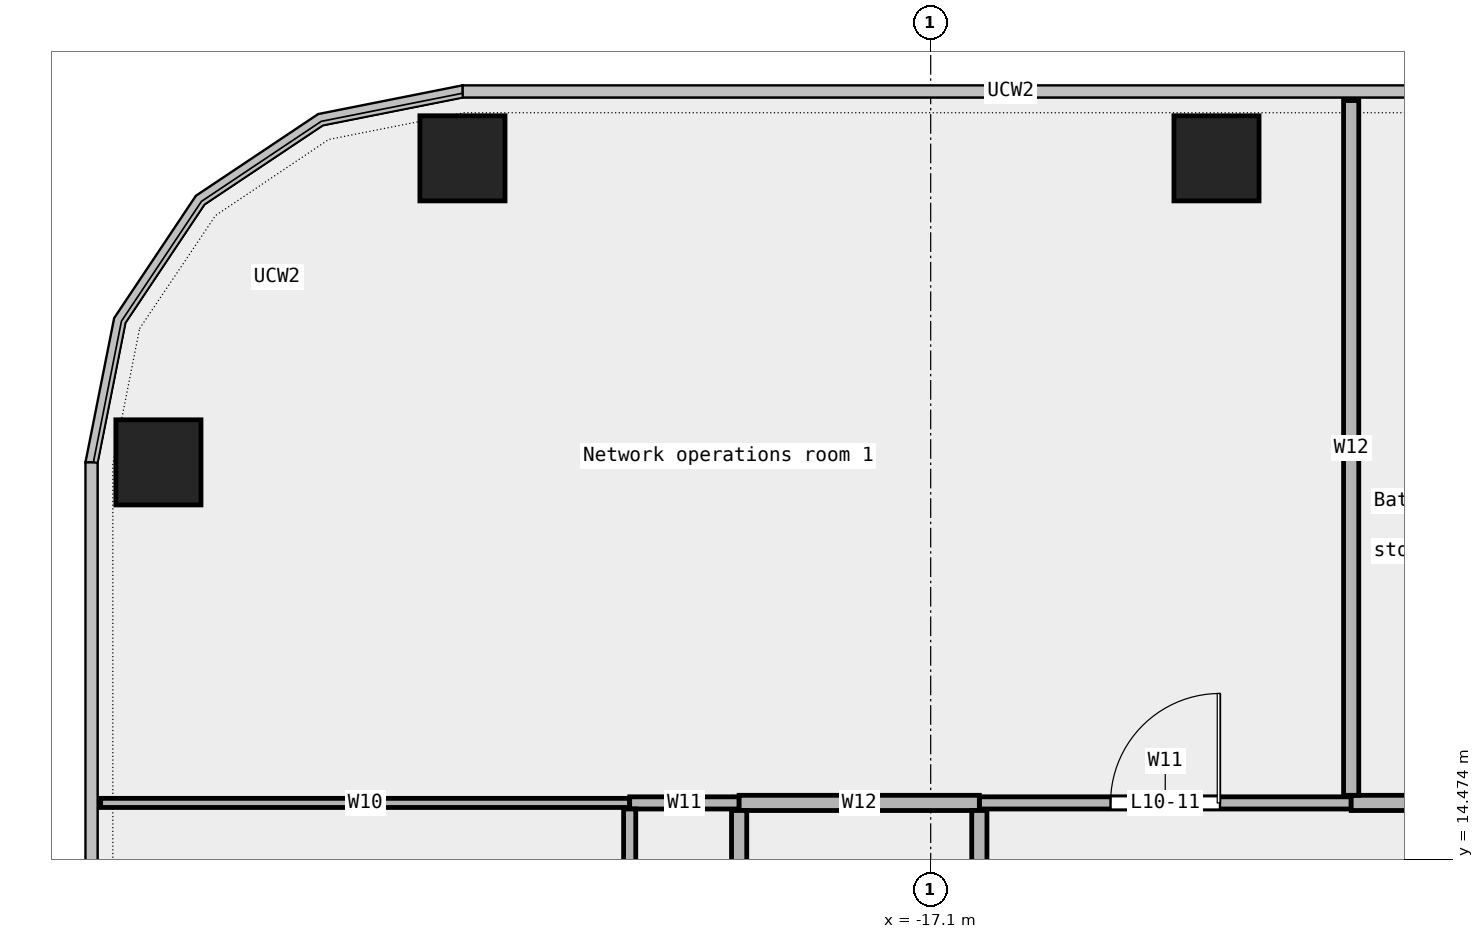
"""IFC4 building model, lengths in metres.
Left out: names, types, materials, properties, quantities, classifications, styles, units other than length and angle.
Written with IfcOpenShell. Run it as: python <this file> out.ifc"""

import sys

from ifc_helpers import new_model, si_unit, direction, frame, frame_2d, origin, origin_2d, place, context, subcontext, project, spatial, rectangle, extrude, element, fill, save


model = new_model("IFC4")
c1 = context("Model", 3, precision=1e-05, world=origin(), true_north=direction((0.0, 1.0)))
c2 = subcontext(c1, "Body", "Model", "MODEL_VIEW")
j1 = project(units=[si_unit("LENGTHUNIT", "METRE"), si_unit("PLANEANGLEUNIT", "RADIAN")], contexts=[c1])
p1 = place(None, origin())
s1 = spatial("IfcSite", under=j1, at=p1, CompositionType="ELEMENT")
p2 = place(p1, origin())
s2 = spatial("IfcBuilding", under=s1, at=p2, CompositionType="ELEMENT")
p3 = place(p2, frame((0.0, 0.0, 55.0)))
s3 = spatial("IfcBuildingStorey", under=s2, at=p3, CompositionType="ELEMENT", Elevation=55.0)
for number, where, z_axis, x_axis in (
    (1, (-12.4, 26.0, 0.0), (0.0, 0.0, 1.0), (1.0, 0.0, 0.0)),
    (2, (-24.8, 26.0, 0.0), (0.0, 0.0, 1.0), (1.0, 0.0, 0.0)),
    (3, (-29.8, 21.0, 0.0), (0.0, 0.0, 1.0), (1.0, 0.0, 0.0)),
):
    element("IfcColumn", number, at=place(p3, frame(where, z_axis=z_axis, x_axis=x_axis)), inside=s3, PredefinedType="COLUMN", context=c2, shape_type="SweptSolid", body=[
        extrude(rectangle(XDim=1.4, YDim=1.4, at=origin_2d()), origin(), (0.0, 0.0, 1.0), 4.35),
    ])
p4 = place(p3, frame((-30.75, 15.4, 0.0), z_axis=(0.0, 0.0, 1.0), x_axis=(1.0, 0.0, 0.0)))
e4 = element("IfcWall", 4, at=p4, inside=s3, PredefinedType="PARTITIONING", context=c2, shape_type="SweptSolid", body=[
    extrude(rectangle(XDim=8.7, YDim=0.15, at=frame_2d((4.35, 0.0))), origin(), (0.0, 0.0, 1.0), 4.35),
])
p5 = place(p3, frame((-22.05, 15.4, 0.0), z_axis=(0.0, 0.0, 1.0), x_axis=(1.0, 0.0, 0.0)))
e5 = element("IfcWall", 5, at=p5, inside=s3, PredefinedType="PARTITIONING", context=c2, shape_type="SweptSolid", body=[
    extrude(rectangle(XDim=1.8, YDim=0.2, at=frame_2d((0.9, 0.0))), origin(), (0.0, 0.0, 1.0), 4.35),
])
p6 = place(p3, frame((-16.3, 15.4, 0.0), z_axis=(0.0, 0.0, 1.0), x_axis=(1.0, 0.0, 0.0)))
e6 = element("IfcWall", 6, at=p6, inside=s3, PredefinedType="PARTITIONING", context=c2, shape_type="SweptSolid", body=[
    extrude(rectangle(XDim=6.115, YDim=0.2, at=frame_2d((3.058, 0.0))), origin(), (0.0, 0.0, 1.0), 4.35),
])
p7 = place(p6, frame((2.157, 0.0, 0.0)))
e7 = element("IfcOpeningElement", 7, at=p7, cuts=e6, PredefinedType="OPENING", context=c2, shape_type="SweptSolid", body=[
    extrude(rectangle(XDim=1.8, YDim=2.1, at=frame_2d((0.9, 1.05))), frame((0.0, 0.112, 0.0), z_axis=(0.0, -1.0, 0.0), x_axis=(1.0, 0.0, 0.0)), (0.0, 0.0, 1.0), 0.224),
])
p8 = place(p3, frame((-20.25, 15.4, 0.0), z_axis=(0.0, 0.0, 1.0), x_axis=(1.0, 0.0, 0.0)))
e8 = element("IfcWall", 8, at=p8, inside=s3, PredefinedType="PARTITIONING", context=c2, shape_type="SweptSolid", body=[
    extrude(rectangle(XDim=3.95, YDim=0.25, at=frame_2d((1.975, 0.0))), origin(), (0.0, 0.0, 1.0), 4.35),
])
p9 = place(p3, frame((-10.185, 15.4, 0.0), z_axis=(0.0, 0.0, 1.0), x_axis=(1.0, 0.0, 0.0)))
e9 = element("IfcWall", 9, at=p9, inside=s3, PredefinedType="PARTITIONING", context=c2, shape_type="SweptSolid", body=[
    extrude(rectangle(XDim=3.42, YDim=0.25, at=frame_2d((1.71, 0.0))), origin(), (0.0, 0.0, 1.0), 4.35),
])
p10 = place(p9, frame((1.26, 0.0, 0.0)))
e10 = element("IfcOpeningElement", 10, at=p10, cuts=e9, PredefinedType="OPENING", context=c2, shape_type="SweptSolid", body=[
    extrude(rectangle(XDim=0.9, YDim=2.1, at=frame_2d((0.45, 1.05))), frame((0.0, 0.137, 0.0), z_axis=(0.0, -1.0, 0.0), x_axis=(1.0, 0.0, 0.0)), (0.0, 0.0, 1.0), 0.274),
])
p11 = place(p3, frame((-22.05, -9.0, 0.0), z_axis=(0.0, 0.0, 1.0), x_axis=(0.0, 1.0, 0.0)))
e11 = element("IfcWall", 11, at=p11, inside=s3, PredefinedType="PARTITIONING", context=c2, shape_type="SweptSolid", body=[
    extrude(rectangle(XDim=24.3, YDim=0.2, at=frame_2d((12.15, 0.0))), origin(), (0.0, 0.0, 1.0), 4.35),
])
p12 = place(p11, frame((17.067, 0.0, 0.0)))
e12 = element("IfcOpeningElement", 12, at=p12, cuts=e11, PredefinedType="OPENING", context=c2, shape_type="SweptSolid", body=[
    extrude(rectangle(XDim=1.5, YDim=2.1, at=frame_2d((0.75, 1.05))), frame((0.0, 0.112, 0.0), z_axis=(0.0, -1.0, 0.0), x_axis=(1.0, 0.0, 0.0)), (0.0, 0.0, 1.0), 0.224),
])
p13 = place(p11, frame((4.768, 0.0, 0.0)))
e13 = element("IfcOpeningElement", 13, at=p13, cuts=e11, PredefinedType="OPENING", context=c2, shape_type="SweptSolid", body=[
    extrude(rectangle(XDim=1.8, YDim=2.1, at=frame_2d((0.9, 1.05))), frame((0.0, 0.112, 0.0), z_axis=(0.0, -1.0, 0.0), x_axis=(1.0, 0.0, 0.0)), (0.0, 0.0, 1.0), 0.224),
])
p14 = place(p3, frame((-20.25, 4.175, 0.0), z_axis=(0.0, 0.0, 1.0), x_axis=(0.0, 1.0, 0.0)))
e14 = element("IfcWall", 14, at=p14, inside=s3, PredefinedType="PARTITIONING", context=c2, shape_type="SweptSolid", body=[
    extrude(rectangle(XDim=11.1, YDim=0.25, at=frame_2d((5.55, 0.0))), origin(), (0.0, 0.0, 1.0), 4.35),
])
p15 = place(p3, frame((-16.3, 11.8, 0.0), z_axis=(0.0, 0.0, 1.0), x_axis=(0.0, 1.0, 0.0)))
e15 = element("IfcWall", 15, at=p15, inside=s3, PredefinedType="PARTITIONING", context=c2, shape_type="SweptSolid", body=[
    extrude(rectangle(XDim=3.475, YDim=0.25, at=frame_2d((1.737, 0.0))), origin(), (0.0, 0.0, 1.0), 4.35),
])
p16 = place(p15, frame((1.288, 0.0, 0.0)))
e16 = element("IfcOpeningElement", 16, at=p16, cuts=e15, PredefinedType="OPENING", context=c2, shape_type="SweptSolid", body=[
    extrude(rectangle(XDim=0.9, YDim=2.1, at=frame_2d((0.45, 1.05))), frame((0.0, 0.137, 0.0), z_axis=(0.0, -1.0, 0.0), x_axis=(1.0, 0.0, 0.0)), (0.0, 0.0, 1.0), 0.274),
])
p17 = place(p3, frame((-10.185, 15.525, 0.0), z_axis=(0.0, 0.0, 1.0), x_axis=(0.0, 1.0, 0.0)))
e17 = element("IfcWall", 17, at=p17, inside=s3, PredefinedType="PARTITIONING", context=c2, shape_type="SweptSolid", body=[
    extrude(rectangle(XDim=11.425, YDim=0.25, at=frame_2d((5.712, 0.0))), origin(), (0.0, 0.0, 1.0), 4.35),
])
p18 = place(p7, origin())
e18 = element("IfcDoor", 18, at=p18, inside=s3, OperationType="DOUBLE_DOOR_SINGLE_SWING", PredefinedType="DOOR", context=c2, shape_type="SweptSolid", body=[
    extrude(rectangle(XDim=1.8, YDim=2.1, at=frame_2d((0.9, 1.05))), frame((0.0, 0.025, 0.0), z_axis=(0.0, -1.0, 0.0), x_axis=(1.0, 0.0, 0.0)), (0.0, 0.0, 1.0), 0.05),
])
fill(e7, e18)
save(model, sys.argv[1])
